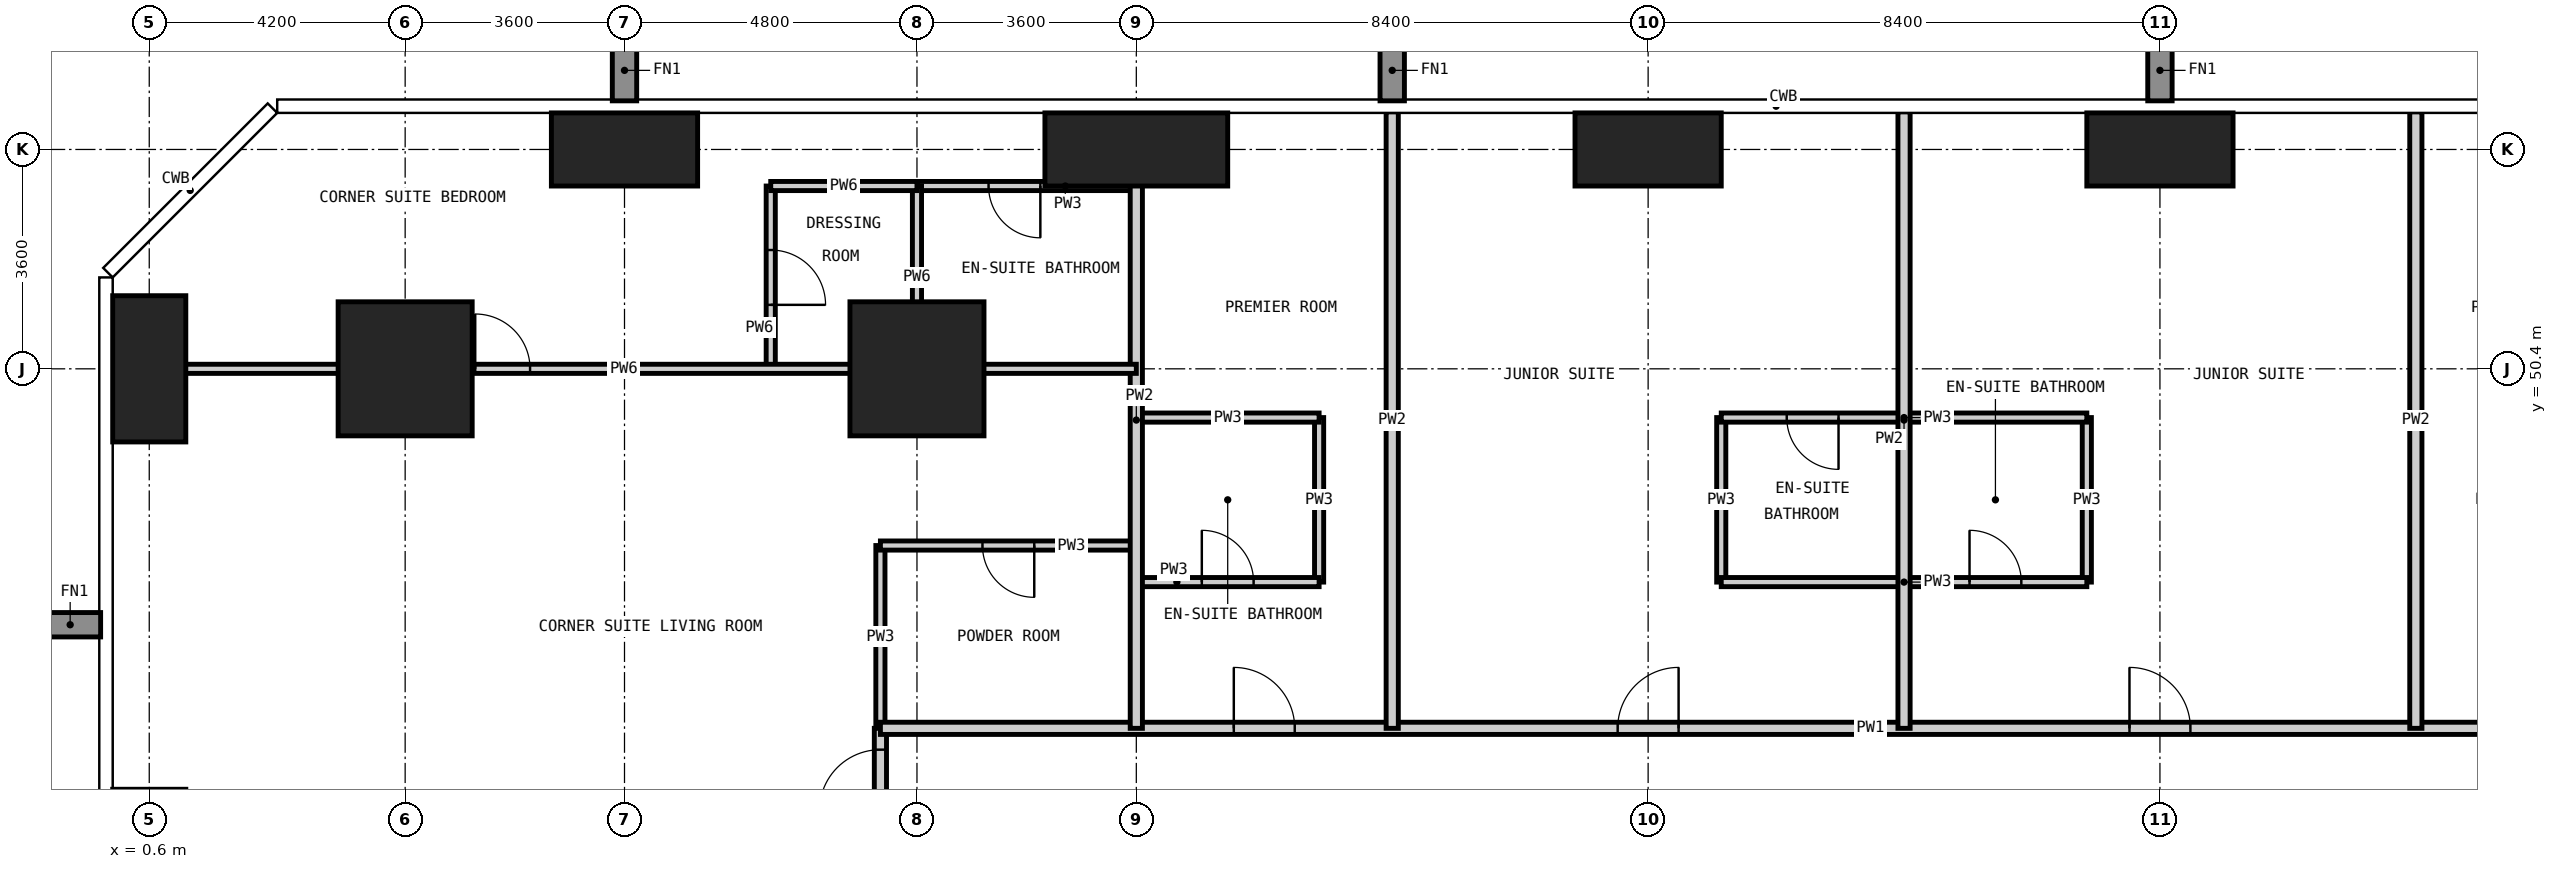
"""IFC4 building model, lengths in metres.
Left out: names, types, materials, properties, quantities, classifications, styles, units other than length and angle.
Written with IfcOpenShell. Run it as: python <this file> out.ifc"""

import sys

from ifc_helpers import new_model, si_unit, direction, frame, frame_2d, origin, origin_2d, place, context, subcontext, project, spatial, rectangle, extrude, element, fill, save


model = new_model("IFC4")
c1 = context("Model", 3, precision=1e-05, world=origin(), true_north=direction((0.0, 1.0)))
c2 = subcontext(c1, "Body", "Model", "MODEL_VIEW")
j1 = project(units=[si_unit("LENGTHUNIT", "METRE"), si_unit("PLANEANGLEUNIT", "RADIAN")], contexts=[c1])
p1 = place(None, origin())
s1 = spatial("IfcSite", under=j1, at=p1, CompositionType="ELEMENT")
p2 = place(p1, origin())
s2 = spatial("IfcBuilding", under=s1, at=p2, CompositionType="ELEMENT")
p3 = place(p2, frame((0.0, 0.0, 144.0)))
s3 = spatial("IfcBuildingStorey", under=s2, at=p3, CompositionType="ELEMENT", Elevation=144.0)
p4 = place(p3, frame((0.6, 50.4, -0.35), z_axis=(0.0, 0.0, 1.0), x_axis=(1.0, 0.0, 0.0)))
e1 = element("IfcColumn", 1, at=p4, inside=s3, PredefinedType="COLUMN", context=c2, shape_type="SweptSolid", body=[
    extrude(rectangle(XDim=1.2, YDim=2.4, at=origin_2d()), origin(), (0.0, 0.0, 1.0), 3.6),
])
p5 = place(p3, frame((4.8, 50.4, -0.35), z_axis=(0.0, 0.0, 1.0), x_axis=(1.0, 0.0, 0.0)))
e2 = element("IfcColumn", 2, at=p5, inside=s3, PredefinedType="COLUMN", context=c2, shape_type="SweptSolid", body=[
    extrude(rectangle(XDim=2.2, YDim=2.2, at=origin_2d()), origin(), (0.0, 0.0, 1.0), 3.6),
])
p6 = place(p3, frame((8.4, 54.0, -0.35), z_axis=(0.0, 0.0, 1.0), x_axis=(1.0, 0.0, 0.0)))
e3 = element("IfcColumn", 3, at=p6, inside=s3, PredefinedType="COLUMN", context=c2, shape_type="SweptSolid", body=[
    extrude(rectangle(XDim=2.4, YDim=1.2, at=origin_2d()), origin(), (0.0, 0.0, 1.0), 3.6),
])
p7 = place(p3, frame((13.2, 50.4, -0.35), z_axis=(0.0, 0.0, 1.0), x_axis=(1.0, 0.0, 0.0)))
e4 = element("IfcColumn", 4, at=p7, inside=s3, PredefinedType="COLUMN", context=c2, shape_type="SweptSolid", body=[
    extrude(rectangle(XDim=2.2, YDim=2.2, at=origin_2d()), origin(), (0.0, 0.0, 1.0), 3.6),
])
p8 = place(p3, frame((16.8, 54.0, -0.35), z_axis=(0.0, 0.0, 1.0), x_axis=(1.0, 0.0, 0.0)))
e5 = element("IfcColumn", 5, at=p8, inside=s3, PredefinedType="COLUMN", context=c2, shape_type="SweptSolid", body=[
    extrude(rectangle(XDim=3.0, YDim=1.2, at=origin_2d()), origin(), (0.0, 0.0, 1.0), 3.6),
])
for number, where, z_axis, x_axis in (
    (6, (25.2, 54.0, -0.35), (0.0, 0.0, 1.0), (1.0, 0.0, 0.0)),
    (7, (33.6, 54.0, -0.35), (0.0, 0.0, 1.0), (1.0, 0.0, 0.0)),
):
    element("IfcColumn", number, at=place(p3, frame(where, z_axis=z_axis, x_axis=x_axis)), inside=s3, PredefinedType="COLUMN", context=c2, shape_type="SweptSolid", body=[
        extrude(rectangle(XDim=2.4, YDim=1.2, at=origin_2d()), origin(), (0.0, 0.0, 1.0), 3.6),
    ])
p9 = place(p3, frame((12.6, 44.5, 0.0), z_axis=(0.0, 0.0, 1.0), x_axis=(0.0, 1.0, 0.0)))
e8 = element("IfcWall", 8, at=p9, inside=s3, PredefinedType="PARTITIONING", context=c2, shape_type="SweptSolid", body=[
    extrude(rectangle(XDim=3.0, YDim=0.15, at=frame_2d((1.5, 0.0))), origin(), (0.0, 0.0, 1.0), 3.25),
])
for number, where, z_axis, x_axis in (
    (9, (19.8, 46.9, 0.0), (0.0, 0.0, 1.0), (0.0, 1.0, 0.0)),
    (10, (26.4, 46.9, 0.0), (0.0, 0.0, 1.0), (0.0, 1.0, 0.0)),
    (11, (32.4, 46.9, 0.0), (0.0, 0.0, 1.0), (0.0, 1.0, 0.0)),
):
    element("IfcWall", number, at=place(p3, frame(where, z_axis=z_axis, x_axis=x_axis)), inside=s3, PredefinedType="PARTITIONING", context=c2, shape_type="SweptSolid", body=[
        extrude(rectangle(XDim=2.7, YDim=0.15, at=frame_2d((1.35, 0.0))), origin(), (0.0, 0.0, 1.0), 3.25),
    ])
p10 = place(p3, frame((16.8, 46.9, 0.0), z_axis=(0.0, 0.0, 1.0), x_axis=(1.0, 0.0, 0.0)))
e12 = element("IfcWall", 12, at=p10, inside=s3, PredefinedType="PARTITIONING", context=c2, shape_type="SweptSolid", body=[
    extrude(rectangle(XDim=3.0, YDim=0.15, at=frame_2d((1.5, 0.0))), origin(), (0.0, 0.0, 1.0), 3.25),
])
p11 = place(p10, frame((1.075, 0.0, 0.0)))
e13 = element("IfcOpeningElement", 13, at=p11, cuts=e12, PredefinedType="OPENING", context=c2, shape_type="SweptSolid", body=[
    extrude(rectangle(XDim=0.85, YDim=2.1, at=frame_2d((0.425, 1.05))), frame((0.0, 0.085, 0.0), z_axis=(0.0, -1.0, 0.0), x_axis=(1.0, 0.0, 0.0)), (0.0, 0.0, 1.0), 0.17),
])
p12 = place(p3, frame((26.4, 46.9, 0.0), z_axis=(0.0, 0.0, 1.0), x_axis=(1.0, 0.0, 0.0)))
e14 = element("IfcWall", 14, at=p12, inside=s3, PredefinedType="PARTITIONING", context=c2, shape_type="SweptSolid", body=[
    extrude(rectangle(XDim=6.0, YDim=0.15, at=frame_2d((3.0, 0.0))), origin(), (0.0, 0.0, 1.0), 3.25),
])
p13 = place(p12, frame((4.075, 0.0, 0.0)))
e15 = element("IfcOpeningElement", 15, at=p13, cuts=e14, PredefinedType="OPENING", context=c2, shape_type="SweptSolid", body=[
    extrude(rectangle(XDim=0.85, YDim=2.1, at=frame_2d((0.425, 1.05))), frame((0.0, 0.085, 0.0), z_axis=(0.0, -1.0, 0.0), x_axis=(1.0, 0.0, 0.0)), (0.0, 0.0, 1.0), 0.17),
])
p14 = place(p3, frame((12.6, 47.5, 0.0), z_axis=(0.0, 0.0, 1.0), x_axis=(1.0, 0.0, 0.0)))
e16 = element("IfcWall", 16, at=p14, inside=s3, PredefinedType="PARTITIONING", context=c2, shape_type="SweptSolid", body=[
    extrude(rectangle(XDim=4.2, YDim=0.15, at=frame_2d((2.1, 0.0))), origin(), (0.0, 0.0, 1.0), 3.25),
])
p15 = place(p14, frame((1.675, 0.0, 0.0)))
e17 = element("IfcOpeningElement", 17, at=p15, cuts=e16, PredefinedType="OPENING", context=c2, shape_type="SweptSolid", body=[
    extrude(rectangle(XDim=0.85, YDim=2.1, at=frame_2d((0.425, 1.05))), frame((0.0, 0.085, 0.0), z_axis=(0.0, -1.0, 0.0), x_axis=(1.0, 0.0, 0.0)), (0.0, 0.0, 1.0), 0.17),
])
p16 = place(p3, frame((16.8, 49.6, 0.0), z_axis=(0.0, 0.0, 1.0), x_axis=(1.0, 0.0, 0.0)))
e18 = element("IfcWall", 18, at=p16, inside=s3, PredefinedType="PARTITIONING", context=c2, shape_type="SweptSolid", body=[
    extrude(rectangle(XDim=3.0, YDim=0.15, at=frame_2d((1.5, 0.0))), origin(), (0.0, 0.0, 1.0), 3.25),
])
p17 = place(p3, frame((26.4, 49.6, 0.0), z_axis=(0.0, 0.0, 1.0), x_axis=(1.0, 0.0, 0.0)))
e19 = element("IfcWall", 19, at=p17, inside=s3, PredefinedType="PARTITIONING", context=c2, shape_type="SweptSolid", body=[
    extrude(rectangle(XDim=6.0, YDim=0.15, at=frame_2d((3.0, 0.0))), origin(), (0.0, 0.0, 1.0), 3.25),
])
p18 = place(p17, frame((1.075, 0.0, 0.0)))
e20 = element("IfcOpeningElement", 20, at=p18, cuts=e19, PredefinedType="OPENING", context=c2, shape_type="SweptSolid", body=[
    extrude(rectangle(XDim=0.85, YDim=2.1, at=frame_2d((0.425, 1.05))), frame((0.0, 0.085, 0.0), z_axis=(0.0, -1.0, 0.0), x_axis=(1.0, 0.0, 0.0)), (0.0, 0.0, 1.0), 0.17),
])
p19 = place(p3, frame((13.2, 53.4, 0.0), z_axis=(0.0, 0.0, 1.0), x_axis=(1.0, 0.0, 0.0)))
e21 = element("IfcWall", 21, at=p19, inside=s3, PredefinedType="PARTITIONING", context=c2, shape_type="SweptSolid", body=[
    extrude(rectangle(XDim=3.6, YDim=0.15, at=frame_2d((1.8, 0.0))), origin(), (0.0, 0.0, 1.0), 3.25),
])
p20 = place(p19, frame((1.175, 0.0, 0.0)))
e22 = element("IfcOpeningElement", 22, at=p20, cuts=e21, PredefinedType="OPENING", context=c2, shape_type="SweptSolid", body=[
    extrude(rectangle(XDim=0.85, YDim=2.1, at=frame_2d((0.425, 1.05))), frame((0.0, 0.085, 0.0), z_axis=(0.0, -1.0, 0.0), x_axis=(1.0, 0.0, 0.0)), (0.0, 0.0, 1.0), 0.17),
])
p21 = place(p3, frame((12.6, 13.1, 0.0), z_axis=(0.0, 0.0, 1.0), x_axis=(0.0, 1.0, 0.0)))
e23 = element("IfcWall", 23, at=p21, inside=s3, PredefinedType="PARTITIONING", context=c2, shape_type="SweptSolid", body=[
    extrude(rectangle(XDim=31.4, YDim=0.2, at=frame_2d((15.7, 0.0))), origin(), (0.0, 0.0, 1.0), 3.25),
])
p22 = place(p21, frame((5.3, 0.0, 0.0)))
e24 = element("IfcOpeningElement", 24, at=p22, cuts=e23, PredefinedType="OPENING", context=c2, shape_type="SweptSolid", body=[
    extrude(rectangle(XDim=1.0, YDim=2.2, at=frame_2d((0.5, 1.1))), frame((0.0, 0.11, 0.0), z_axis=(0.0, -1.0, 0.0), x_axis=(1.0, 0.0, 0.0)), (0.0, 0.0, 1.0), 0.22),
])
p23 = place(p21, frame((13.3, 0.0, 0.0)))
e25 = element("IfcOpeningElement", 25, at=p23, cuts=e23, PredefinedType="OPENING", context=c2, shape_type="SweptSolid", body=[
    extrude(rectangle(XDim=1.0, YDim=2.2, at=frame_2d((0.5, 1.1))), frame((0.0, 0.11, 0.0), z_axis=(0.0, -1.0, 0.0), x_axis=(1.0, 0.0, 0.0)), (0.0, 0.0, 1.0), 0.22),
])
p24 = place(p21, frame((18.3, 0.0, 0.0)))
e26 = element("IfcOpeningElement", 26, at=p24, cuts=e23, PredefinedType="OPENING", context=c2, shape_type="SweptSolid", body=[
    extrude(rectangle(XDim=1.0, YDim=2.2, at=frame_2d((0.5, 1.1))), frame((0.0, 0.11, 0.0), z_axis=(0.0, -1.0, 0.0), x_axis=(1.0, 0.0, 0.0)), (0.0, 0.0, 1.0), 0.22),
])
p25 = place(p21, frame((26.3, 0.0, 0.0)))
e27 = element("IfcOpeningElement", 27, at=p25, cuts=e23, PredefinedType="OPENING", context=c2, shape_type="SweptSolid", body=[
    extrude(rectangle(XDim=1.0, YDim=2.2, at=frame_2d((0.5, 1.1))), frame((0.0, 0.11, 0.0), z_axis=(0.0, -1.0, 0.0), x_axis=(1.0, 0.0, 0.0)), (0.0, 0.0, 1.0), 0.22),
])
p26 = place(p21, frame((1.35, 0.0, 0.0)))
e28 = element("IfcOpeningElement", 28, at=p26, cuts=e23, PredefinedType="OPENING", context=c2, shape_type="SweptSolid", body=[
    extrude(rectangle(XDim=1.0, YDim=2.2, at=frame_2d((0.5, 1.1))), frame((0.0, 0.11, 0.0), z_axis=(0.0, -1.0, 0.0), x_axis=(1.0, 0.0, 0.0)), (0.0, 0.0, 1.0), 0.22),
])
p27 = place(p21, frame((30.05, 0.0, 0.0)))
e29 = element("IfcOpeningElement", 29, at=p27, cuts=e23, PredefinedType="OPENING", context=c2, shape_type="SweptSolid", body=[
    extrude(rectangle(XDim=1.0, YDim=2.2, at=frame_2d((0.5, 1.1))), frame((0.0, 0.11, 0.0), z_axis=(0.0, -1.0, 0.0), x_axis=(1.0, 0.0, 0.0)), (0.0, 0.0, 1.0), 0.22),
])
p28 = place(p3, frame((12.6, 44.5, 0.0), z_axis=(0.0, 0.0, 1.0), x_axis=(1.0, 0.0, 0.0)))
e30 = element("IfcWall", 30, at=p28, inside=s3, PredefinedType="PARTITIONING", context=c2, shape_type="SweptSolid", body=[
    extrude(rectangle(XDim=32.5, YDim=0.2, at=frame_2d((16.25, 0.0))), origin(), (0.0, 0.0, 1.0), 3.25),
])
p29 = place(p28, frame((5.8, 0.0, 0.0)))
e31 = element("IfcOpeningElement", 31, at=p29, cuts=e30, PredefinedType="OPENING", context=c2, shape_type="SweptSolid", body=[
    extrude(rectangle(XDim=1.0, YDim=2.2, at=frame_2d((0.5, 1.1))), frame((0.0, 0.11, 0.0), z_axis=(0.0, -1.0, 0.0), x_axis=(1.0, 0.0, 0.0)), (0.0, 0.0, 1.0), 0.22),
])
p30 = place(p28, frame((12.1, 0.0, 0.0)))
e32 = element("IfcOpeningElement", 32, at=p30, cuts=e30, PredefinedType="OPENING", context=c2, shape_type="SweptSolid", body=[
    extrude(rectangle(XDim=1.0, YDim=2.2, at=frame_2d((0.5, 1.1))), frame((0.0, 0.11, 0.0), z_axis=(0.0, -1.0, 0.0), x_axis=(1.0, 0.0, 0.0)), (0.0, 0.0, 1.0), 0.22),
])
p31 = place(p28, frame((20.5, 0.0, 0.0)))
e33 = element("IfcOpeningElement", 33, at=p31, cuts=e30, PredefinedType="OPENING", context=c2, shape_type="SweptSolid", body=[
    extrude(rectangle(XDim=1.0, YDim=2.2, at=frame_2d((0.5, 1.1))), frame((0.0, 0.11, 0.0), z_axis=(0.0, -1.0, 0.0), x_axis=(1.0, 0.0, 0.0)), (0.0, 0.0, 1.0), 0.22),
])
p32 = place(p28, frame((26.8, 0.0, 0.0)))
e34 = element("IfcOpeningElement", 34, at=p32, cuts=e30, PredefinedType="OPENING", context=c2, shape_type="SweptSolid", body=[
    extrude(rectangle(XDim=1.0, YDim=2.2, at=frame_2d((0.5, 1.1))), frame((0.0, 0.11, 0.0), z_axis=(0.0, -1.0, 0.0), x_axis=(1.0, 0.0, 0.0)), (0.0, 0.0, 1.0), 0.22),
])
for number, where, z_axis, x_axis in (
    (35, (16.8, 44.5, 0.0), (0.0, 0.0, 1.0), (0.0, 1.0, 0.0)),
    (36, (21.0, 44.5, 0.0), (0.0, 0.0, 1.0), (0.0, 1.0, 0.0)),
    (37, (29.4, 44.5, 0.0), (0.0, 0.0, 1.0), (0.0, 1.0, 0.0)),
    (38, (37.8, 44.5, 0.0), (0.0, 0.0, 1.0), (0.0, 1.0, 0.0)),
):
    element("IfcWall", number, at=place(p3, frame(where, z_axis=z_axis, x_axis=x_axis)), inside=s3, PredefinedType="PARTITIONING", context=c2, shape_type="SweptSolid", body=[
        extrude(rectangle(XDim=10.118, YDim=0.2, at=frame_2d((5.059, 0.0))), origin(), (0.0, 0.0, 1.0), 3.25),
    ])
p33 = place(p3, frame((10.8, 50.4, 0.0), z_axis=(0.0, 0.0, 1.0), x_axis=(0.0, 1.0, 0.0)))
e39 = element("IfcWall", 39, at=p33, inside=s3, PredefinedType="PARTITIONING", context=c2, shape_type="SweptSolid", body=[
    extrude(rectangle(XDim=3.0, YDim=0.15, at=frame_2d((1.5, 0.0))), origin(), (0.0, 0.0, 1.0), 3.25),
])
p34 = place(p33, frame((1.05, 0.0, 0.0)))
e40 = element("IfcOpeningElement", 40, at=p34, cuts=e39, PredefinedType="OPENING", context=c2, shape_type="SweptSolid", body=[
    extrude(rectangle(XDim=0.9, YDim=2.1, at=frame_2d((0.45, 1.05))), frame((0.0, 0.085, 0.0), z_axis=(0.0, -1.0, 0.0), x_axis=(1.0, 0.0, 0.0)), (0.0, 0.0, 1.0), 0.17),
])
p35 = place(p3, frame((13.2, 50.4, 0.0), z_axis=(0.0, 0.0, 1.0), x_axis=(0.0, 1.0, 0.0)))
e41 = element("IfcWall", 41, at=p35, inside=s3, PredefinedType="PARTITIONING", context=c2, shape_type="SweptSolid", body=[
    extrude(rectangle(XDim=3.0, YDim=0.15, at=frame_2d((1.5, 0.0))), origin(), (0.0, 0.0, 1.0), 3.25),
])
p36 = place(p3, frame((-0.018, 50.4, 0.0), z_axis=(0.0, 0.0, 1.0), x_axis=(1.0, 0.0, 0.0)))
e42 = element("IfcWall", 42, at=p36, inside=s3, PredefinedType="PARTITIONING", context=c2, shape_type="SweptSolid", body=[
    extrude(rectangle(XDim=16.818, YDim=0.15, at=frame_2d((8.409, 0.0))), origin(), (0.0, 0.0, 1.0), 3.25),
])
p37 = place(p36, frame((5.968, 0.0, 0.0)))
e43 = element("IfcOpeningElement", 43, at=p37, cuts=e42, PredefinedType="OPENING", context=c2, shape_type="SweptSolid", body=[
    extrude(rectangle(XDim=0.9, YDim=2.1, at=frame_2d((0.45, 1.05))), frame((0.0, 0.085, 0.0), z_axis=(0.0, -1.0, 0.0), x_axis=(1.0, 0.0, 0.0)), (0.0, 0.0, 1.0), 0.17),
])
p38 = place(p3, frame((10.8, 53.4, 0.0), z_axis=(0.0, 0.0, 1.0), x_axis=(1.0, 0.0, 0.0)))
e44 = element("IfcWall", 44, at=p38, inside=s3, PredefinedType="PARTITIONING", context=c2, shape_type="SweptSolid", body=[
    extrude(rectangle(XDim=2.4, YDim=0.15, at=frame_2d((1.2, 0.0))), origin(), (0.0, 0.0, 1.0), 3.25),
])
p39 = place(p29, origin())
e45 = element("IfcDoor", 45, at=p39, inside=s3, OperationType="SINGLE_SWING_LEFT", PredefinedType="DOOR", context=c2, shape_type="SweptSolid", body=[
    extrude(rectangle(XDim=1.0, YDim=2.2, at=frame_2d((0.5, 1.1))), frame((0.0, 0.025, 0.0), z_axis=(0.0, -1.0, 0.0), x_axis=(1.0, 0.0, 0.0)), (0.0, 0.0, 1.0), 0.05),
])
fill(e31, e45)
p40 = place(p11, origin())
e46 = element("IfcDoor", 46, at=p40, inside=s3, OperationType="SINGLE_SWING_LEFT", PredefinedType="DOOR", context=c2, shape_type="SweptSolid", body=[
    extrude(rectangle(XDim=0.85, YDim=2.1, at=frame_2d((0.425, 1.05))), frame((0.0, 0.025, 0.0), z_axis=(0.0, -1.0, 0.0), x_axis=(1.0, 0.0, 0.0)), (0.0, 0.0, 1.0), 0.05),
])
fill(e13, e46)
p41 = place(p30, origin())
e47 = element("IfcDoor", 47, at=p41, inside=s3, OperationType="SINGLE_SWING_RIGHT", PredefinedType="DOOR", context=c2, shape_type="SweptSolid", body=[
    extrude(rectangle(XDim=1.0, YDim=2.2, at=frame_2d((0.5, 1.1))), frame((0.0, 0.025, 0.0), z_axis=(0.0, -1.0, 0.0), x_axis=(1.0, 0.0, 0.0)), (0.0, 0.0, 1.0), 0.05),
])
fill(e32, e47)
p42 = place(p18, frame((0.85, 0.0, 0.0), z_axis=(0.0, 0.0, 1.0), x_axis=(-1.0, 0.0, 0.0)))
e48 = element("IfcDoor", 48, at=p42, inside=s3, OperationType="SINGLE_SWING_LEFT", PredefinedType="DOOR", context=c2, shape_type="SweptSolid", body=[
    extrude(rectangle(XDim=0.85, YDim=2.1, at=frame_2d((0.425, 1.05))), frame((0.0, 0.025, 0.0), z_axis=(0.0, -1.0, 0.0), x_axis=(1.0, 0.0, 0.0)), (0.0, 0.0, 1.0), 0.05),
])
fill(e20, e48)
p43 = place(p31, origin())
e49 = element("IfcDoor", 49, at=p43, inside=s3, OperationType="SINGLE_SWING_LEFT", PredefinedType="DOOR", context=c2, shape_type="SweptSolid", body=[
    extrude(rectangle(XDim=1.0, YDim=2.2, at=frame_2d((0.5, 1.1))), frame((0.0, 0.025, 0.0), z_axis=(0.0, -1.0, 0.0), x_axis=(1.0, 0.0, 0.0)), (0.0, 0.0, 1.0), 0.05),
])
fill(e33, e49)
p44 = place(p13, origin())
e50 = element("IfcDoor", 50, at=p44, inside=s3, OperationType="SINGLE_SWING_LEFT", PredefinedType="DOOR", context=c2, shape_type="SweptSolid", body=[
    extrude(rectangle(XDim=0.85, YDim=2.1, at=frame_2d((0.425, 1.05))), frame((0.0, 0.025, 0.0), z_axis=(0.0, -1.0, 0.0), x_axis=(1.0, 0.0, 0.0)), (0.0, 0.0, 1.0), 0.05),
])
fill(e15, e50)
p45 = place(p27, origin())
e51 = element("IfcDoor", 51, at=p45, inside=s3, OperationType="SINGLE_SWING_LEFT", PredefinedType="DOOR", context=c2, shape_type="SweptSolid", body=[
    extrude(rectangle(XDim=1.0, YDim=2.2, at=frame_2d((0.5, 1.1))), frame((0.0, 0.025, 0.0), z_axis=(0.0, -1.0, 0.0), x_axis=(1.0, 0.0, 0.0)), (0.0, 0.0, 1.0), 0.05),
])
fill(e29, e51)
p46 = place(p15, frame((0.85, 0.0, 0.0), z_axis=(0.0, 0.0, 1.0), x_axis=(-1.0, 0.0, 0.0)))
e52 = element("IfcDoor", 52, at=p46, inside=s3, OperationType="SINGLE_SWING_LEFT", PredefinedType="DOOR", context=c2, shape_type="SweptSolid", body=[
    extrude(rectangle(XDim=0.85, YDim=2.1, at=frame_2d((0.425, 1.05))), frame((0.0, 0.025, 0.0), z_axis=(0.0, -1.0, 0.0), x_axis=(1.0, 0.0, 0.0)), (0.0, 0.0, 1.0), 0.05),
])
fill(e17, e52)
p47 = place(p37, origin())
e53 = element("IfcDoor", 53, at=p47, inside=s3, OperationType="SINGLE_SWING_LEFT", PredefinedType="DOOR", context=c2, shape_type="SweptSolid", body=[
    extrude(rectangle(XDim=0.9, YDim=2.1, at=frame_2d((0.45, 1.05))), frame((0.0, 0.025, 0.0), z_axis=(0.0, -1.0, 0.0), x_axis=(1.0, 0.0, 0.0)), (0.0, 0.0, 1.0), 0.05),
])
fill(e43, e53)
p48 = place(p20, frame((0.85, 0.0, 0.0), z_axis=(0.0, 0.0, 1.0), x_axis=(-1.0, 0.0, 0.0)))
e54 = element("IfcDoor", 54, at=p48, inside=s3, OperationType="SINGLE_SWING_LEFT", PredefinedType="DOOR", context=c2, shape_type="SweptSolid", body=[
    extrude(rectangle(XDim=0.85, YDim=2.1, at=frame_2d((0.425, 1.05))), frame((0.0, 0.025, 0.0), z_axis=(0.0, -1.0, 0.0), x_axis=(1.0, 0.0, 0.0)), (0.0, 0.0, 1.0), 0.05),
])
fill(e22, e54)
p49 = place(p34, frame((0.9, 0.0, 0.0), z_axis=(0.0, 0.0, 1.0), x_axis=(-1.0, 0.0, 0.0)))
e55 = element("IfcDoor", 55, at=p49, inside=s3, OperationType="SINGLE_SWING_RIGHT", PredefinedType="DOOR", context=c2, shape_type="SweptSolid", body=[
    extrude(rectangle(XDim=0.9, YDim=2.1, at=frame_2d((0.45, 1.05))), frame((0.0, 0.025, 0.0), z_axis=(0.0, -1.0, 0.0), x_axis=(1.0, 0.0, 0.0)), (0.0, 0.0, 1.0), 0.05),
])
fill(e40, e55)
save(model, sys.argv[1])
